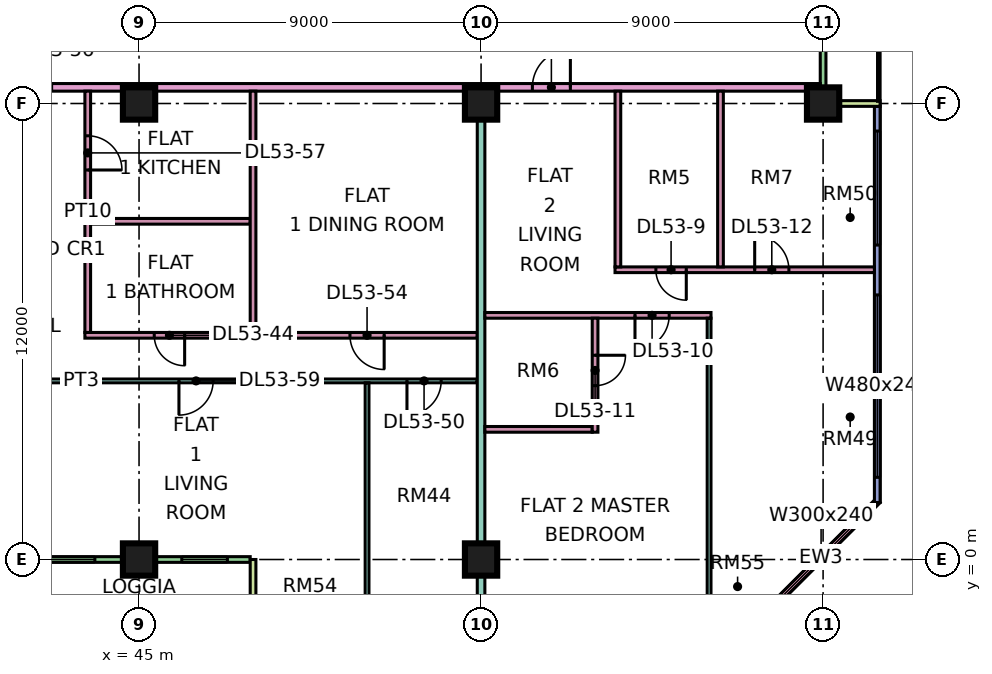
"""IFC4 building model, lengths in metres.
Left out: names, types, materials, properties, quantities, classifications, styles, units other than length and angle.
Written with IfcOpenShell. Run it as: python <this file> out.ifc"""

import sys

from ifc_helpers import new_model, si_unit, direction, frame, frame_2d, origin, origin_2d, place, context, subcontext, project, spatial, rectangle, extrude, element, fill, save


model = new_model("IFC4")
c1 = context("Model", 3, precision=1e-05, world=origin(), true_north=direction((0.0, 1.0)))
c2 = subcontext(c1, "Body", "Model", "MODEL_VIEW")
j1 = project(units=[si_unit("LENGTHUNIT", "METRE"), si_unit("PLANEANGLEUNIT", "RADIAN")], contexts=[c1])
p1 = place(None, origin())
s1 = spatial("IfcSite", under=j1, at=p1, CompositionType="ELEMENT")
p2 = place(p1, origin())
s2 = spatial("IfcBuilding", under=s1, at=p2, CompositionType="ELEMENT")
p3 = place(p2, frame((0.0, 0.0, 226.65)))
s3 = spatial("IfcBuildingStorey", under=s2, at=p3, CompositionType="ELEMENT", Elevation=226.65)
for number, where, z_axis, x_axis in (
    (1, (45.0, 0.0, 0.0), (0.0, 0.0, 1.0), (1.0, 0.0, 0.0)),
    (2, (45.0, 12.0, 0.0), (0.0, 0.0, 1.0), (1.0, 0.0, 0.0)),
    (3, (54.0, 0.0, 0.0), (0.0, 0.0, 1.0), (1.0, 0.0, 0.0)),
    (4, (54.0, 12.0, 0.0), (0.0, 0.0, 1.0), (1.0, 0.0, 0.0)),
    (5, (63.0, 12.0, 0.0), (0.0, 0.0, 1.0), (1.0, 0.0, 0.0)),
):
    element("IfcColumn", number, at=place(p3, frame(where, z_axis=z_axis, x_axis=x_axis)), inside=s3, PredefinedType="COLUMN", context=c2, shape_type="SweptSolid", body=[
        extrude(rectangle(XDim=0.85, YDim=0.85, at=origin_2d()), origin(), (0.0, 0.0, 1.0), 3.75),
    ])
p4 = place(p3, frame((36.075, 0.0, 0.0), z_axis=(0.0, 0.0, 1.0), x_axis=(1.0, 0.0, 0.0)))
e6 = element("IfcWall", 6, at=p4, inside=s3, PredefinedType="SOLIDWALL", context=c2, shape_type="SweptSolid", body=[
    extrude(rectangle(XDim=11.85, YDim=0.15, at=frame_2d((5.925, 0.0))), origin(), (0.0, 0.0, 1.0), 3.35),
])
p5 = place(p4, frame((1.087, 0.0, 0.0)))
e7 = element("IfcOpeningElement", 7, at=p5, cuts=e6, PredefinedType="OPENING", context=c2, shape_type="SweptSolid", body=[
    extrude(rectangle(XDim=1.2, YDim=2.4, at=frame_2d((0.6, 1.2))), frame((0.0, 0.085, 0.0), z_axis=(0.0, -1.0, 0.0), x_axis=(1.0, 0.0, 0.0)), (0.0, 0.0, 1.0), 0.17),
])
p6 = place(p4, frame((3.525, 0.0, 0.45)))
e8 = element("IfcOpeningElement", 8, at=p6, cuts=e6, PredefinedType="OPENING", context=c2, shape_type="SweptSolid", body=[
    extrude(rectangle(XDim=1.8, YDim=2.4, at=frame_2d((0.9, 1.2))), frame((0.0, 0.085, 0.0), z_axis=(0.0, -1.0, 0.0), x_axis=(1.0, 0.0, 0.0)), (0.0, 0.0, 1.0), 0.17),
])
p7 = place(p4, frame((6.562, 0.0, 0.45)))
e9 = element("IfcOpeningElement", 9, at=p7, cuts=e6, PredefinedType="OPENING", context=c2, shape_type="SweptSolid", body=[
    extrude(rectangle(XDim=1.2, YDim=2.4, at=frame_2d((0.6, 1.2))), frame((0.0, 0.085, 0.0), z_axis=(0.0, -1.0, 0.0), x_axis=(1.0, 0.0, 0.0)), (0.0, 0.0, 1.0), 0.17),
])
p8 = place(p4, frame((10.05, 0.0, 0.45)))
e10 = element("IfcOpeningElement", 10, at=p8, cuts=e6, PredefinedType="OPENING", context=c2, shape_type="SweptSolid", body=[
    extrude(rectangle(XDim=1.2, YDim=2.4, at=frame_2d((0.6, 1.2))), frame((0.0, 0.085, 0.0), z_axis=(0.0, -1.0, 0.0), x_axis=(1.0, 0.0, 0.0)), (0.0, 0.0, 1.0), 0.17),
])
p9 = place(p3, frame((48.0, -1.5, 0.0), z_axis=(0.0, 0.0, 1.0), x_axis=(0.0, 1.0, 0.0)))
e11 = element("IfcWall", 11, at=p9, inside=s3, PredefinedType="SOLIDWALL", context=c2, shape_type="SweptSolid", body=[
    extrude(rectangle(XDim=1.5, YDim=0.15, at=frame_2d((0.75, 0.0))), origin(), (0.0, 0.0, 1.0), 3.35),
])
p10 = place(p3, frame((61.447, -1.447, 0.0), z_axis=(0.0, 0.0, 1.0), x_axis=(0.707106781187, 0.707106781187, 0.0)))
e12 = element("IfcWall", 12, at=p10, inside=s3, PredefinedType="SOLIDWALL", context=c2, shape_type="SweptSolid", body=[
    extrude(rectangle(XDim=4.243, YDim=0.15, at=frame_2d((2.121, 0.0))), origin(), (0.0, 0.0, 1.0), 3.35),
])
p11 = place(p10, frame((0.621, 0.0, 0.45)))
e13 = element("IfcOpeningElement", 13, at=p11, cuts=e12, PredefinedType="OPENING", context=c2, shape_type="SweptSolid", body=[
    extrude(rectangle(XDim=3.0, YDim=2.4, at=frame_2d((1.5, 1.2))), frame((0.0, 0.085, 0.0), z_axis=(0.0, -1.0, 0.0), x_axis=(1.0, 0.0, 0.0)), (0.0, 0.0, 1.0), 0.17),
])
p12 = place(p3, frame((64.425, 1.5, 0.0), z_axis=(0.0, 0.0, 1.0), x_axis=(0.0, 1.0, 0.0)))
e14 = element("IfcWall", 14, at=p12, inside=s3, PredefinedType="SOLIDWALL", context=c2, shape_type="SweptSolid", body=[
    extrude(rectangle(XDim=10.425, YDim=0.15, at=frame_2d((5.212, 0.0))), origin(), (0.0, 0.0, 1.0), 3.35),
])
p13 = place(p12, frame((0.663, 0.0, 0.45)))
e15 = element("IfcOpeningElement", 15, at=p13, cuts=e14, PredefinedType="OPENING", context=c2, shape_type="SweptSolid", body=[
    extrude(rectangle(XDim=4.8, YDim=2.4, at=frame_2d((2.4, 1.2))), frame((0.0, 0.085, 0.0), z_axis=(0.0, -1.0, 0.0), x_axis=(1.0, 0.0, 0.0)), (0.0, 0.0, 1.0), 0.17),
])
p14 = place(p12, frame((6.775, 0.0, 0.45)))
e16 = element("IfcOpeningElement", 16, at=p14, cuts=e14, PredefinedType="OPENING", context=c2, shape_type="SweptSolid", body=[
    extrude(rectangle(XDim=3.0, YDim=2.4, at=frame_2d((1.5, 1.2))), frame((0.0, 0.085, 0.0), z_axis=(0.0, -1.0, 0.0), x_axis=(1.0, 0.0, 0.0)), (0.0, 0.0, 1.0), 0.17),
])
p15 = place(p3, frame((63.0, 12.075, 0.0), z_axis=(0.0, 0.0, 1.0), x_axis=(0.0, 1.0, 0.0)))
e17 = element("IfcWall", 17, at=p15, inside=s3, PredefinedType="SOLIDWALL", context=c2, shape_type="SweptSolid", body=[
    extrude(rectangle(XDim=10.35, YDim=0.15, at=frame_2d((5.175, 0.0))), origin(), (0.0, 0.0, 1.0), 3.35),
])
p16 = place(p15, frame((3.975, 0.0, 0.45)))
e18 = element("IfcOpeningElement", 18, at=p16, cuts=e17, PredefinedType="OPENING", context=c2, shape_type="SweptSolid", body=[
    extrude(rectangle(XDim=1.8, YDim=2.4, at=frame_2d((0.9, 1.2))), frame((0.0, 0.085, 0.0), z_axis=(0.0, -1.0, 0.0), x_axis=(1.0, 0.0, 0.0)), (0.0, 0.0, 1.0), 0.17),
])
p17 = place(p15, frame((7.387, 0.0, 0.0)))
e19 = element("IfcOpeningElement", 19, at=p17, cuts=e17, PredefinedType="OPENING", context=c2, shape_type="SweptSolid", body=[
    extrude(rectangle(XDim=1.8, YDim=2.4, at=frame_2d((0.9, 1.2))), frame((0.0, 0.085, 0.0), z_axis=(0.0, -1.0, 0.0), x_axis=(1.0, 0.0, 0.0)), (0.0, 0.0, 1.0), 0.17),
])
p18 = place(p3, frame((64.5, 12.0, 0.0), z_axis=(0.0, 0.0, 1.0), x_axis=(-1.0, 0.0, 0.0)))
e20 = element("IfcWall", 20, at=p18, inside=s3, PredefinedType="SOLIDWALL", context=c2, shape_type="SweptSolid", body=[
    extrude(rectangle(XDim=1.5, YDim=0.15, at=frame_2d((0.75, 0.0))), origin(), (0.0, 0.0, 1.0), 3.35),
])
p19 = place(p3, frame((33.05, 4.7, 0.0), z_axis=(0.0, 0.0, 1.0), x_axis=(1.0, 0.0, 0.0)))
e21 = element("IfcWall", 21, at=p19, inside=s3, PredefinedType="PARTITIONING", context=c2, shape_type="SweptSolid", body=[
    extrude(rectangle(XDim=20.85, YDim=0.1, at=frame_2d((10.425, 0.0))), origin(), (0.0, 0.0, 1.0), 3.35),
])
p20 = place(p19, frame((1.0, 0.0, 0.0)))
e22 = element("IfcOpeningElement", 22, at=p20, cuts=e21, PredefinedType="OPENING", context=c2, shape_type="SweptSolid", body=[
    extrude(rectangle(XDim=0.9, YDim=2.1, at=frame_2d((0.45, 1.05))), frame((0.0, 0.06, 0.0), z_axis=(0.0, -1.0, 0.0), x_axis=(1.0, 0.0, 0.0)), (0.0, 0.0, 1.0), 0.12),
])
p21 = place(p19, frame((4.0, 0.0, 0.0)))
e23 = element("IfcOpeningElement", 23, at=p21, cuts=e21, PredefinedType="OPENING", context=c2, shape_type="SweptSolid", body=[
    extrude(rectangle(XDim=0.9, YDim=2.1, at=frame_2d((0.45, 1.05))), frame((0.0, 0.06, 0.0), z_axis=(0.0, -1.0, 0.0), x_axis=(1.0, 0.0, 0.0)), (0.0, 0.0, 1.0), 0.12),
])
p22 = place(p19, frame((7.0, 0.0, 0.0)))
e24 = element("IfcOpeningElement", 24, at=p22, cuts=e21, PredefinedType="OPENING", context=c2, shape_type="SweptSolid", body=[
    extrude(rectangle(XDim=0.9, YDim=2.1, at=frame_2d((0.45, 1.05))), frame((0.0, 0.06, 0.0), z_axis=(0.0, -1.0, 0.0), x_axis=(1.0, 0.0, 0.0)), (0.0, 0.0, 1.0), 0.12),
])
p23 = place(p19, frame((19.0, 0.0, 0.0)))
e25 = element("IfcOpeningElement", 25, at=p23, cuts=e21, PredefinedType="OPENING", context=c2, shape_type="SweptSolid", body=[
    extrude(rectangle(XDim=0.9, YDim=2.1, at=frame_2d((0.45, 1.05))), frame((0.0, 0.06, 0.0), z_axis=(0.0, -1.0, 0.0), x_axis=(1.0, 0.0, 0.0)), (0.0, 0.0, 1.0), 0.12),
])
p24 = place(p19, frame((13.0, 0.0, 0.0)))
e26 = element("IfcOpeningElement", 26, at=p24, cuts=e21, PredefinedType="OPENING", context=c2, shape_type="SweptSolid", body=[
    extrude(rectangle(XDim=0.9, YDim=2.1, at=frame_2d((0.45, 1.05))), frame((0.0, 0.06, 0.0), z_axis=(0.0, -1.0, 0.0), x_axis=(1.0, 0.0, 0.0)), (0.0, 0.0, 1.0), 0.12),
])
p25 = place(p3, frame((40.65, 12.425, 0.0), z_axis=(0.0, 0.0, 1.0), x_axis=(1.0, 0.0, 0.0)))
e27 = element("IfcWall", 27, at=p25, inside=s3, PredefinedType="PARTITIONING", context=c2, shape_type="SweptSolid", body=[
    extrude(rectangle(XDim=22.276, YDim=0.2, at=frame_2d((11.138, 0.0))), origin(), (0.0, 0.0, 1.0), 3.35),
])
p26 = place(p25, frame((14.7, 0.0, 0.0)))
e28 = element("IfcOpeningElement", 28, at=p26, cuts=e27, PredefinedType="OPENING", context=c2, shape_type="SweptSolid", body=[
    extrude(rectangle(XDim=1.0, YDim=2.1, at=frame_2d((0.5, 1.05))), frame((0.0, 0.11, 0.0), z_axis=(0.0, -1.0, 0.0), x_axis=(1.0, 0.0, 0.0)), (0.0, 0.0, 1.0), 0.22),
])
p27 = place(p25, frame((1.05, 0.0, 0.0)))
e29 = element("IfcOpeningElement", 29, at=p27, cuts=e27, PredefinedType="OPENING", context=c2, shape_type="SweptSolid", body=[
    extrude(rectangle(XDim=1.0, YDim=2.1, at=frame_2d((0.5, 1.05))), frame((0.0, 0.11, 0.0), z_axis=(0.0, -1.0, 0.0), x_axis=(1.0, 0.0, 0.0)), (0.0, 0.0, 1.0), 0.22),
])
p28 = place(p3, frame((43.575, 5.9, 0.0), z_axis=(0.0, 0.0, 1.0), x_axis=(1.0, 0.0, 0.0)))
e30 = element("IfcWall", 30, at=p28, inside=s3, PredefinedType="PARTITIONING", context=c2, shape_type="SweptSolid", body=[
    extrude(rectangle(XDim=10.325, YDim=0.15, at=frame_2d((5.163, 0.0))), origin(), (0.0, 0.0, 1.0), 3.35),
])
p29 = place(p28, frame((1.825, 0.0, 0.0)))
e31 = element("IfcOpeningElement", 31, at=p29, cuts=e30, PredefinedType="OPENING", context=c2, shape_type="SweptSolid", body=[
    extrude(rectangle(XDim=0.8, YDim=2.1, at=frame_2d((0.4, 1.05))), frame((0.0, 0.085, 0.0), z_axis=(0.0, -1.0, 0.0), x_axis=(1.0, 0.0, 0.0)), (0.0, 0.0, 1.0), 0.17),
])
p30 = place(p28, frame((6.975, 0.0, 0.0)))
e32 = element("IfcOpeningElement", 32, at=p30, cuts=e30, PredefinedType="OPENING", context=c2, shape_type="SweptSolid", body=[
    extrude(rectangle(XDim=0.9, YDim=2.1, at=frame_2d((0.45, 1.05))), frame((0.0, 0.085, 0.0), z_axis=(0.0, -1.0, 0.0), x_axis=(1.0, 0.0, 0.0)), (0.0, 0.0, 1.0), 0.17),
])
p31 = place(p3, frame((43.65, 5.975, 0.0), z_axis=(0.0, 0.0, 1.0), x_axis=(0.0, 1.0, 0.0)))
e33 = element("IfcWall", 33, at=p31, inside=s3, PredefinedType="PARTITIONING", context=c2, shape_type="SweptSolid", body=[
    extrude(rectangle(XDim=6.35, YDim=0.15, at=frame_2d((3.175, 0.0))), origin(), (0.0, 0.0, 1.0), 3.35),
])
p32 = place(p31, frame((4.275, 0.0, 0.0)))
e34 = element("IfcOpeningElement", 34, at=p32, cuts=e33, PredefinedType="OPENING", context=c2, shape_type="SweptSolid", body=[
    extrude(rectangle(XDim=0.9, YDim=2.1, at=frame_2d((0.45, 1.05))), frame((0.0, 0.085, 0.0), z_axis=(0.0, -1.0, 0.0), x_axis=(1.0, 0.0, 0.0)), (0.0, 0.0, 1.0), 0.17),
])
p33 = place(p3, frame((43.725, 8.9, 0.0), z_axis=(0.0, 0.0, 1.0), x_axis=(1.0, 0.0, 0.0)))
e35 = element("IfcWall", 35, at=p33, inside=s3, PredefinedType="PARTITIONING", context=c2, shape_type="SweptSolid", body=[
    extrude(rectangle(XDim=4.2, YDim=0.15, at=frame_2d((2.1, 0.0))), origin(), (0.0, 0.0, 1.0), 3.35),
])
p34 = place(p3, frame((48.0, 5.975, 0.0), z_axis=(0.0, 0.0, 1.0), x_axis=(0.0, 1.0, 0.0)))
e36 = element("IfcWall", 36, at=p34, inside=s3, PredefinedType="PARTITIONING", context=c2, shape_type="SweptSolid", body=[
    extrude(rectangle(XDim=6.35, YDim=0.15, at=frame_2d((3.175, 0.0))), origin(), (0.0, 0.0, 1.0), 3.35),
])
p35 = place(p3, frame((51.0, -1.35, 0.0), z_axis=(0.0, 0.0, 1.0), x_axis=(0.0, 1.0, 0.0)))
e37 = element("IfcWall", 37, at=p35, inside=s3, PredefinedType="PARTITIONING", context=c2, shape_type="SweptSolid", body=[
    extrude(rectangle(XDim=6.0, YDim=0.1, at=frame_2d((3.0, 0.0))), origin(), (0.0, 0.0, 1.0), 3.35),
])
p36 = place(p3, frame((54.0, -1.351, 0.0), z_axis=(0.0, 0.0, 1.0), x_axis=(0.0, 1.0, 0.0)))
e38 = element("IfcWall", 38, at=p36, inside=s3, PredefinedType="PARTITIONING", context=c2, shape_type="SweptSolid", body=[
    extrude(rectangle(XDim=13.676, YDim=0.2, at=frame_2d((6.838, 0.0))), origin(), (0.0, 0.0, 1.0), 3.35),
])
p37 = place(p3, frame((54.1, 3.425, 0.0), z_axis=(0.0, 0.0, 1.0), x_axis=(1.0, 0.0, 0.0)))
e39 = element("IfcWall", 39, at=p37, inside=s3, PredefinedType="PARTITIONING", context=c2, shape_type="SweptSolid", body=[
    extrude(rectangle(XDim=2.825, YDim=0.15, at=frame_2d((1.413, 0.0))), origin(), (0.0, 0.0, 1.0), 3.35),
])
p38 = place(p3, frame((54.1, 6.425, 0.0), z_axis=(0.0, 0.0, 1.0), x_axis=(1.0, 0.0, 0.0)))
e40 = element("IfcWall", 40, at=p38, inside=s3, PredefinedType="PARTITIONING", context=c2, shape_type="SweptSolid", body=[
    extrude(rectangle(XDim=5.95, YDim=0.15, at=frame_2d((2.975, 0.0))), origin(), (0.0, 0.0, 1.0), 3.35),
])
p39 = place(p38, frame((3.95, 0.0, 0.0)))
e41 = element("IfcOpeningElement", 41, at=p39, cuts=e40, PredefinedType="OPENING", context=c2, shape_type="SweptSolid", body=[
    extrude(rectangle(XDim=0.9, YDim=2.1, at=frame_2d((0.45, 1.05))), frame((0.0, 0.085, 0.0), z_axis=(0.0, -1.0, 0.0), x_axis=(1.0, 0.0, 0.0)), (0.0, 0.0, 1.0), 0.17),
])
p40 = place(p3, frame((57.0, 3.35, 0.0), z_axis=(0.0, 0.0, 1.0), x_axis=(0.0, 1.0, 0.0)))
e42 = element("IfcWall", 42, at=p40, inside=s3, PredefinedType="PARTITIONING", context=c2, shape_type="SweptSolid", body=[
    extrude(rectangle(XDim=3.0, YDim=0.15, at=frame_2d((1.5, 0.0))), origin(), (0.0, 0.0, 1.0), 3.35),
])
p41 = place(p40, frame((1.225, 0.0, 0.0)))
e43 = element("IfcOpeningElement", 43, at=p41, cuts=e42, PredefinedType="OPENING", context=c2, shape_type="SweptSolid", body=[
    extrude(rectangle(XDim=0.8, YDim=2.1, at=frame_2d((0.4, 1.05))), frame((0.0, 0.085, 0.0), z_axis=(0.0, -1.0, 0.0), x_axis=(1.0, 0.0, 0.0)), (0.0, 0.0, 1.0), 0.17),
])
p42 = place(p3, frame((57.525, 7.625, 0.0), z_axis=(0.0, 0.0, 1.0), x_axis=(1.0, 0.0, 0.0)))
e44 = element("IfcWall", 44, at=p42, inside=s3, PredefinedType="PARTITIONING", context=c2, shape_type="SweptSolid", body=[
    extrude(rectangle(XDim=6.825, YDim=0.15, at=frame_2d((3.413, 0.0))), origin(), (0.0, 0.0, 1.0), 3.35),
])
p43 = place(p42, frame((1.075, 0.0, 0.0)))
e45 = element("IfcOpeningElement", 45, at=p43, cuts=e44, PredefinedType="OPENING", context=c2, shape_type="SweptSolid", body=[
    extrude(rectangle(XDim=0.8, YDim=2.1, at=frame_2d((0.4, 1.05))), frame((0.0, 0.085, 0.0), z_axis=(0.0, -1.0, 0.0), x_axis=(1.0, 0.0, 0.0)), (0.0, 0.0, 1.0), 0.17),
])
p44 = place(p42, frame((3.675, 0.0, 0.0)))
e46 = element("IfcOpeningElement", 46, at=p44, cuts=e44, PredefinedType="OPENING", context=c2, shape_type="SweptSolid", body=[
    extrude(rectangle(XDim=0.9, YDim=2.1, at=frame_2d((0.45, 1.05))), frame((0.0, 0.085, 0.0), z_axis=(0.0, -1.0, 0.0), x_axis=(1.0, 0.0, 0.0)), (0.0, 0.0, 1.0), 0.17),
])
p45 = place(p3, frame((57.6, 7.7, 0.0), z_axis=(0.0, 0.0, 1.0), x_axis=(0.0, 1.0, 0.0)))
e47 = element("IfcWall", 47, at=p45, inside=s3, PredefinedType="PARTITIONING", context=c2, shape_type="SweptSolid", body=[
    extrude(rectangle(XDim=4.625, YDim=0.15, at=frame_2d((2.312, 0.0))), origin(), (0.0, 0.0, 1.0), 3.35),
])
p46 = place(p3, frame((60.0, -1.35, 0.0), z_axis=(0.0, 0.0, 1.0), x_axis=(0.0, 1.0, 0.0)))
e48 = element("IfcWall", 48, at=p46, inside=s3, PredefinedType="PARTITIONING", context=c2, shape_type="SweptSolid", body=[
    extrude(rectangle(XDim=7.7, YDim=0.1, at=frame_2d((3.85, 0.0))), origin(), (0.0, 0.0, 1.0), 3.35),
])
p47 = place(p3, frame((60.3, 7.7, 0.0), z_axis=(0.0, 0.0, 1.0), x_axis=(0.0, 1.0, 0.0)))
e49 = element("IfcWall", 49, at=p47, inside=s3, PredefinedType="PARTITIONING", context=c2, shape_type="SweptSolid", body=[
    extrude(rectangle(XDim=4.625, YDim=0.15, at=frame_2d((2.312, 0.0))), origin(), (0.0, 0.0, 1.0), 3.35),
])
p48 = place(p7, origin())
e50 = element("IfcWindow", 50, at=p48, inside=s3, PartitioningType="SINGLE_PANEL", PredefinedType="WINDOW", context=c2, shape_type="SweptSolid", body=[
    extrude(rectangle(XDim=1.2, YDim=2.4, at=frame_2d((0.6, 1.2))), frame((0.0, 0.03, 0.0), z_axis=(0.0, -1.0, 0.0), x_axis=(1.0, 0.0, 0.0)), (0.0, 0.0, 1.0), 0.06),
])
fill(e9, e50)
p49 = place(p8, origin())
e51 = element("IfcWindow", 51, at=p49, inside=s3, PartitioningType="SINGLE_PANEL", PredefinedType="WINDOW", context=c2, shape_type="SweptSolid", body=[
    extrude(rectangle(XDim=1.2, YDim=2.4, at=frame_2d((0.6, 1.2))), frame((0.0, 0.03, 0.0), z_axis=(0.0, -1.0, 0.0), x_axis=(1.0, 0.0, 0.0)), (0.0, 0.0, 1.0), 0.06),
])
fill(e10, e51)
p50 = place(p11, origin())
e52 = element("IfcWindow", 52, at=p50, inside=s3, PartitioningType="SINGLE_PANEL", PredefinedType="WINDOW", context=c2, shape_type="SweptSolid", body=[
    extrude(rectangle(XDim=3.0, YDim=2.4, at=frame_2d((1.5, 1.2))), frame((0.0, 0.03, 0.0), z_axis=(0.0, -1.0, 0.0), x_axis=(1.0, 0.0, 0.0)), (0.0, 0.0, 1.0), 0.06),
])
fill(e13, e52)
p51 = place(p13, origin())
e53 = element("IfcWindow", 53, at=p51, inside=s3, PartitioningType="SINGLE_PANEL", PredefinedType="WINDOW", context=c2, shape_type="SweptSolid", body=[
    extrude(rectangle(XDim=4.8, YDim=2.4, at=frame_2d((2.4, 1.2))), frame((0.0, 0.03, 0.0), z_axis=(0.0, -1.0, 0.0), x_axis=(1.0, 0.0, 0.0)), (0.0, 0.0, 1.0), 0.06),
])
fill(e15, e53)
p52 = place(p14, origin())
e54 = element("IfcWindow", 54, at=p52, inside=s3, PartitioningType="SINGLE_PANEL", PredefinedType="WINDOW", context=c2, shape_type="SweptSolid", body=[
    extrude(rectangle(XDim=3.0, YDim=2.4, at=frame_2d((1.5, 1.2))), frame((0.0, 0.03, 0.0), z_axis=(0.0, -1.0, 0.0), x_axis=(1.0, 0.0, 0.0)), (0.0, 0.0, 1.0), 0.06),
])
fill(e16, e54)
p53 = place(p43, origin())
e55 = element("IfcDoor", 55, at=p53, inside=s3, OperationType="SINGLE_SWING_RIGHT", PredefinedType="DOOR", context=c2, shape_type="SweptSolid", body=[
    extrude(rectangle(XDim=0.8, YDim=2.1, at=frame_2d((0.4, 1.05))), frame((0.0, 0.025, 0.0), z_axis=(0.0, -1.0, 0.0), x_axis=(1.0, 0.0, 0.0)), (0.0, 0.0, 1.0), 0.05),
])
fill(e45, e55)
p54 = place(p39, frame((0.9, 0.0, 0.0), z_axis=(0.0, 0.0, 1.0), x_axis=(-1.0, 0.0, 0.0)))
e56 = element("IfcDoor", 56, at=p54, inside=s3, OperationType="SINGLE_SWING_LEFT", PredefinedType="DOOR", context=c2, shape_type="SweptSolid", body=[
    extrude(rectangle(XDim=0.9, YDim=2.1, at=frame_2d((0.45, 1.05))), frame((0.0, 0.025, 0.0), z_axis=(0.0, -1.0, 0.0), x_axis=(1.0, 0.0, 0.0)), (0.0, 0.0, 1.0), 0.05),
])
fill(e41, e56)
p55 = place(p41, origin())
e57 = element("IfcDoor", 57, at=p55, inside=s3, OperationType="SINGLE_SWING_RIGHT", PredefinedType="DOOR", context=c2, shape_type="SweptSolid", body=[
    extrude(rectangle(XDim=0.8, YDim=2.1, at=frame_2d((0.4, 1.05))), frame((0.0, 0.025, 0.0), z_axis=(0.0, -1.0, 0.0), x_axis=(1.0, 0.0, 0.0)), (0.0, 0.0, 1.0), 0.05),
])
fill(e43, e57)
p56 = place(p44, origin())
e58 = element("IfcDoor", 58, at=p56, inside=s3, OperationType="SINGLE_SWING_LEFT", PredefinedType="DOOR", context=c2, shape_type="SweptSolid", body=[
    extrude(rectangle(XDim=0.9, YDim=2.1, at=frame_2d((0.45, 1.05))), frame((0.0, 0.025, 0.0), z_axis=(0.0, -1.0, 0.0), x_axis=(1.0, 0.0, 0.0)), (0.0, 0.0, 1.0), 0.05),
])
fill(e46, e58)
p57 = place(p26, frame((1.0, 0.0, 0.0), z_axis=(0.0, 0.0, 1.0), x_axis=(-1.0, 0.0, 0.0)))
e59 = element("IfcDoor", 59, at=p57, inside=s3, OperationType="SINGLE_SWING_RIGHT", PredefinedType="DOOR", context=c2, shape_type="SweptSolid", body=[
    extrude(rectangle(XDim=1.0, YDim=2.1, at=frame_2d((0.5, 1.05))), frame((0.0, 0.025, 0.0), z_axis=(0.0, -1.0, 0.0), x_axis=(1.0, 0.0, 0.0)), (0.0, 0.0, 1.0), 0.05),
])
fill(e28, e59)
p58 = place(p29, origin())
e60 = element("IfcDoor", 60, at=p58, inside=s3, OperationType="SINGLE_SWING_RIGHT", PredefinedType="DOOR", context=c2, shape_type="SweptSolid", body=[
    extrude(rectangle(XDim=0.8, YDim=2.1, at=frame_2d((0.4, 1.05))), frame((0.0, 0.025, 0.0), z_axis=(0.0, -1.0, 0.0), x_axis=(1.0, 0.0, 0.0)), (0.0, 0.0, 1.0), 0.05),
])
fill(e31, e60)
p59 = place(p23, frame((0.9, 0.0, 0.0), z_axis=(0.0, 0.0, 1.0), x_axis=(-1.0, 0.0, 0.0)))
e61 = element("IfcDoor", 61, at=p59, inside=s3, OperationType="SINGLE_SWING_LEFT", PredefinedType="DOOR", context=c2, shape_type="SweptSolid", body=[
    extrude(rectangle(XDim=0.9, YDim=2.1, at=frame_2d((0.45, 1.05))), frame((0.0, 0.025, 0.0), z_axis=(0.0, -1.0, 0.0), x_axis=(1.0, 0.0, 0.0)), (0.0, 0.0, 1.0), 0.05),
])
fill(e25, e61)
p60 = place(p30, origin())
e62 = element("IfcDoor", 62, at=p60, inside=s3, OperationType="SINGLE_SWING_RIGHT", PredefinedType="DOOR", context=c2, shape_type="SweptSolid", body=[
    extrude(rectangle(XDim=0.9, YDim=2.1, at=frame_2d((0.45, 1.05))), frame((0.0, 0.025, 0.0), z_axis=(0.0, -1.0, 0.0), x_axis=(1.0, 0.0, 0.0)), (0.0, 0.0, 1.0), 0.05),
])
fill(e32, e62)
p61 = place(p32, frame((0.9, 0.0, 0.0), z_axis=(0.0, 0.0, 1.0), x_axis=(-1.0, 0.0, 0.0)))
e63 = element("IfcDoor", 63, at=p61, inside=s3, OperationType="SINGLE_SWING_LEFT", PredefinedType="DOOR", context=c2, shape_type="SweptSolid", body=[
    extrude(rectangle(XDim=0.9, YDim=2.1, at=frame_2d((0.45, 1.05))), frame((0.0, 0.025, 0.0), z_axis=(0.0, -1.0, 0.0), x_axis=(1.0, 0.0, 0.0)), (0.0, 0.0, 1.0), 0.05),
])
fill(e34, e63)
p62 = place(p24, frame((0.9, 0.0, 0.0), z_axis=(0.0, 0.0, 1.0), x_axis=(-1.0, 0.0, 0.0)))
e64 = element("IfcDoor", 64, at=p62, inside=s3, OperationType="SINGLE_SWING_LEFT", PredefinedType="DOOR", context=c2, shape_type="SweptSolid", body=[
    extrude(rectangle(XDim=0.9, YDim=2.1, at=frame_2d((0.45, 1.05))), frame((0.0, 0.025, 0.0), z_axis=(0.0, -1.0, 0.0), x_axis=(1.0, 0.0, 0.0)), (0.0, 0.0, 1.0), 0.05),
])
fill(e26, e64)
save(model, sys.argv[1])
